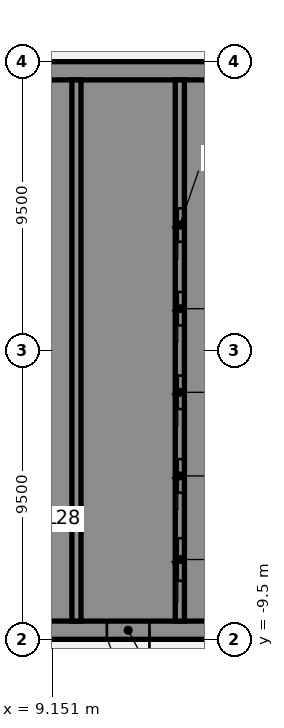
"""IFC4 building model, lengths in metres.
Left out: names, types, materials, properties, quantities, classifications, styles, units other than length and angle.
Written with IfcOpenShell. Run it as: python <this file> out.ifc"""

import sys

from ifc_helpers import new_model, si_unit, direction, frame, frame_2d, origin, place, context, subcontext, project, spatial, polyline, rectangle, outline, extrude, element, fill, save


model = new_model("IFC4")
c1 = context("Model", 3, precision=1e-05, world=origin(), true_north=direction((0.0, 1.0)))
c2 = subcontext(c1, "Body", "Model", "MODEL_VIEW")
j1 = project(units=[si_unit("LENGTHUNIT", "METRE"), si_unit("PLANEANGLEUNIT", "RADIAN")], contexts=[c1])
p1 = place(None, origin())
s1 = spatial("IfcSite", under=j1, at=p1, CompositionType="ELEMENT")
p2 = place(p1, origin())
s2 = spatial("IfcBuilding", under=s1, at=p2, CompositionType="ELEMENT")
p3 = place(p2, frame((0.0, 0.0, 117.25)))
s3 = spatial("IfcBuildingStorey", under=s2, at=p3, CompositionType="ELEMENT", Elevation=117.25)
p4 = place(p3, frame((16.5, -9.2, 0.0), z_axis=(0.0, 0.0, 1.0), x_axis=(-1.0, 0.0, 0.0)))
e1 = element("IfcWall", 1, at=p4, inside=s3, PredefinedType="SHEAR", context=c2, shape_type="SweptSolid", body=[
    extrude(rectangle(XDim=13.0, YDim=0.6, at=frame_2d((6.5, 0.0))), origin(), (0.0, 0.0, 1.0), 3.61),
])
p5 = place(p4, frame((4.15, 0.0, 0.0)))
e2 = element("IfcOpeningElement", 2, at=p5, cuts=e1, PredefinedType="OPENING", context=c2, shape_type="SweptSolid", body=[
    extrude(rectangle(XDim=1.4, YDim=2.1, at=frame_2d((0.7, 1.05))), frame((0.0, 0.31, 0.0), z_axis=(0.0, -1.0, 0.0), x_axis=(1.0, 0.0, 0.0)), (0.0, 0.0, 1.0), 0.62),
])
p6 = place(p4, frame((10.125, 0.0, 0.0)))
e3 = element("IfcOpeningElement", 3, at=p6, cuts=e1, PredefinedType="OPENING", context=c2, shape_type="SweptSolid", body=[
    extrude(rectangle(XDim=1.4, YDim=2.1, at=frame_2d((0.7, 1.05))), frame((0.0, 0.31, 0.0), z_axis=(0.0, -1.0, 0.0), x_axis=(1.0, 0.0, 0.0)), (0.0, 0.0, 1.0), 0.62),
])
p7 = place(p3, origin())
e4 = element("IfcWall", 4, at=p7, inside=s3, PredefinedType="SHEAR", context=c2, shape_type="SweptSolid", body=[
    extrude(outline(polyline([(13.5, -8.9), (15.9, -8.9), (16.5, -8.9), (16.5, 8.9), (15.9, 8.9), (13.5, 8.9), (13.5, 8.125), (15.9, 8.125), (15.9, 5.625), (13.5, 5.625), (13.5, 5.375), (15.9, 5.375), (15.9, 2.875), (13.5, 2.875), (13.5, 2.625), (15.9, 2.625), (15.9, 0.125), (13.5, 0.125), (13.5, -0.125), (15.9, -0.125), (15.9, -2.625), (13.5, -2.625), (13.5, -2.875), (15.9, -2.875), (15.9, -5.375), (13.5, -5.375), (13.5, -5.625), (15.9, -5.625), (15.9, -8.125), (13.5, -8.125), (13.5, -8.9)])), origin(), (0.0, 0.0, 1.0), 3.61),
])
p8 = place(p3, frame((16.5, 9.2, 0.0), z_axis=(0.0, 0.0, 1.0), x_axis=(-1.0, 0.0, 0.0)))
e5 = element("IfcWall", 5, at=p8, inside=s3, PredefinedType="SHEAR", context=c2, shape_type="SweptSolid", body=[
    extrude(rectangle(XDim=13.0, YDim=0.6, at=frame_2d((6.5, 0.0))), origin(), (0.0, 0.0, 1.0), 3.61),
])
p9 = place(p3, origin())
e6 = element("IfcWall", 6, at=p9, inside=s3, PredefinedType="SHEAR", context=c2, shape_type="SweptSolid", body=[
    extrude(outline(polyline([(9.8, -5.375), (7.5, -5.375), (7.5, -2.875), (9.8, -2.875), (9.8, -2.625), (7.5, -2.625), (7.5, -0.125), (9.8, -0.125), (9.8, 0.125), (7.5, 0.125), (7.5, 2.625), (9.8, 2.625), (9.8, 2.875), (7.5, 2.875), (7.5, 5.375), (9.8, 5.375), (9.8, 5.625), (7.5, 5.625), (7.5, 8.125), (9.8, 8.125), (9.8, 8.9), (7.5, 8.9), (7.2, 8.9), (7.2, -5.625), (7.5, -5.625), (9.8, -5.625), (9.8, -5.375)])), origin(), (0.0, 0.0, 1.0), 3.61),
])
p10 = place(p3, origin())
e7 = element("IfcWall", 7, at=p10, inside=s3, PredefinedType="SHEAR", context=c2, shape_type="SweptSolid", body=[
    extrude(outline(polyline([(7.5, -8.125), (7.5, -8.9), (9.8, -8.9), (9.8, -8.125), (9.8, -5.625), (9.55, -5.625), (9.55, -8.125), (7.5, -8.125)])), origin(), (0.0, 0.0, 1.0), 3.61),
])
p11 = place(p3, frame((13.35, -8.9, 0.0), z_axis=(0.0, 0.0, 1.0), x_axis=(0.0, 1.0, 0.0)))
e8 = element("IfcWall", 8, at=p11, inside=s3, PredefinedType="SHEAR", context=c2, shape_type="SweptSolid", body=[
    extrude(rectangle(XDim=17.8, YDim=0.3, at=frame_2d((8.9, 0.0))), origin(), (0.0, 0.0, 1.0), 3.61),
])
p12 = place(p11, frame((1.325, 0.0, 0.0)))
e9 = element("IfcOpeningElement", 9, at=p12, cuts=e8, PredefinedType="OPENING", context=c2, shape_type="SweptSolid", body=[
    extrude(rectangle(XDim=1.4, YDim=2.1, at=frame_2d((0.7, 1.05))), frame((0.0, 0.16, 0.0), z_axis=(0.0, -1.0, 0.0), x_axis=(1.0, 0.0, 0.0)), (0.0, 0.0, 1.0), 0.32),
])
p13 = place(p11, frame((4.225, 0.0, 0.0)))
e10 = element("IfcOpeningElement", 10, at=p13, cuts=e8, PredefinedType="OPENING", context=c2, shape_type="SweptSolid", body=[
    extrude(rectangle(XDim=1.1, YDim=2.1, at=frame_2d((0.55, 1.05))), frame((0.0, 0.16, 0.0), z_axis=(0.0, -1.0, 0.0), x_axis=(1.0, 0.0, 0.0)), (0.0, 0.0, 1.0), 0.32),
])
p14 = place(p11, frame((6.975, 0.0, 0.0)))
e11 = element("IfcOpeningElement", 11, at=p14, cuts=e8, PredefinedType="OPENING", context=c2, shape_type="SweptSolid", body=[
    extrude(rectangle(XDim=1.1, YDim=2.1, at=frame_2d((0.55, 1.05))), frame((0.0, 0.16, 0.0), z_axis=(0.0, -1.0, 0.0), x_axis=(1.0, 0.0, 0.0)), (0.0, 0.0, 1.0), 0.32),
])
p15 = place(p11, frame((9.725, 0.0, 0.0)))
e12 = element("IfcOpeningElement", 12, at=p15, cuts=e8, PredefinedType="OPENING", context=c2, shape_type="SweptSolid", body=[
    extrude(rectangle(XDim=1.1, YDim=2.1, at=frame_2d((0.55, 1.05))), frame((0.0, 0.16, 0.0), z_axis=(0.0, -1.0, 0.0), x_axis=(1.0, 0.0, 0.0)), (0.0, 0.0, 1.0), 0.32),
])
p16 = place(p11, frame((12.475, 0.0, 0.0)))
e13 = element("IfcOpeningElement", 13, at=p16, cuts=e8, PredefinedType="OPENING", context=c2, shape_type="SweptSolid", body=[
    extrude(rectangle(XDim=1.1, YDim=2.1, at=frame_2d((0.55, 1.05))), frame((0.0, 0.16, 0.0), z_axis=(0.0, -1.0, 0.0), x_axis=(1.0, 0.0, 0.0)), (0.0, 0.0, 1.0), 0.32),
])
p17 = place(p3, frame((9.95, -8.9, 0.0), z_axis=(0.0, 0.0, 1.0), x_axis=(0.0, 1.0, 0.0)))
e14 = element("IfcWall", 14, at=p17, inside=s3, PredefinedType="SHEAR", context=c2, shape_type="SweptSolid", body=[
    extrude(rectangle(XDim=17.8, YDim=0.3, at=frame_2d((8.9, 0.0))), origin(), (0.0, 0.0, 1.0), 3.61),
])
p18 = place(p5, origin())
e15 = element("IfcDoor", 15, at=p18, inside=s3, OperationType="SINGLE_SWING_LEFT", PredefinedType="DOOR", context=c2, shape_type="SweptSolid", body=[
    extrude(rectangle(XDim=1.4, YDim=2.1, at=frame_2d((0.7, 1.05))), frame((0.0, 0.025, 0.0), z_axis=(0.0, -1.0, 0.0), x_axis=(1.0, 0.0, 0.0)), (0.0, 0.0, 1.0), 0.05),
])
fill(e2, e15)
p19 = place(p12, origin())
e16 = element("IfcDoor", 16, at=p19, inside=s3, OperationType="SLIDING_TO_LEFT", PredefinedType="DOOR", context=c2, shape_type="SweptSolid", body=[
    extrude(rectangle(XDim=1.4, YDim=2.1, at=frame_2d((0.7, 1.05))), frame((0.0, 0.025, 0.0), z_axis=(0.0, -1.0, 0.0), x_axis=(1.0, 0.0, 0.0)), (0.0, 0.0, 1.0), 0.05),
])
fill(e9, e16)
p20 = place(p13, origin())
e17 = element("IfcDoor", 17, at=p20, inside=s3, OperationType="SLIDING_TO_LEFT", PredefinedType="DOOR", context=c2, shape_type="SweptSolid", body=[
    extrude(rectangle(XDim=1.1, YDim=2.1, at=frame_2d((0.55, 1.05))), frame((0.0, 0.025, 0.0), z_axis=(0.0, -1.0, 0.0), x_axis=(1.0, 0.0, 0.0)), (0.0, 0.0, 1.0), 0.05),
])
fill(e10, e17)
p21 = place(p14, origin())
e18 = element("IfcDoor", 18, at=p21, inside=s3, OperationType="SLIDING_TO_LEFT", PredefinedType="DOOR", context=c2, shape_type="SweptSolid", body=[
    extrude(rectangle(XDim=1.1, YDim=2.1, at=frame_2d((0.55, 1.05))), frame((0.0, 0.025, 0.0), z_axis=(0.0, -1.0, 0.0), x_axis=(1.0, 0.0, 0.0)), (0.0, 0.0, 1.0), 0.05),
])
fill(e11, e18)
p22 = place(p15, origin())
e19 = element("IfcDoor", 19, at=p22, inside=s3, OperationType="SLIDING_TO_LEFT", PredefinedType="DOOR", context=c2, shape_type="SweptSolid", body=[
    extrude(rectangle(XDim=1.1, YDim=2.1, at=frame_2d((0.55, 1.05))), frame((0.0, 0.025, 0.0), z_axis=(0.0, -1.0, 0.0), x_axis=(1.0, 0.0, 0.0)), (0.0, 0.0, 1.0), 0.05),
])
fill(e12, e19)
p23 = place(p16, origin())
e20 = element("IfcDoor", 20, at=p23, inside=s3, OperationType="SLIDING_TO_LEFT", PredefinedType="DOOR", context=c2, shape_type="SweptSolid", body=[
    extrude(rectangle(XDim=1.1, YDim=2.1, at=frame_2d((0.55, 1.05))), frame((0.0, 0.025, 0.0), z_axis=(0.0, -1.0, 0.0), x_axis=(1.0, 0.0, 0.0)), (0.0, 0.0, 1.0), 0.05),
])
fill(e13, e20)
save(model, sys.argv[1])
